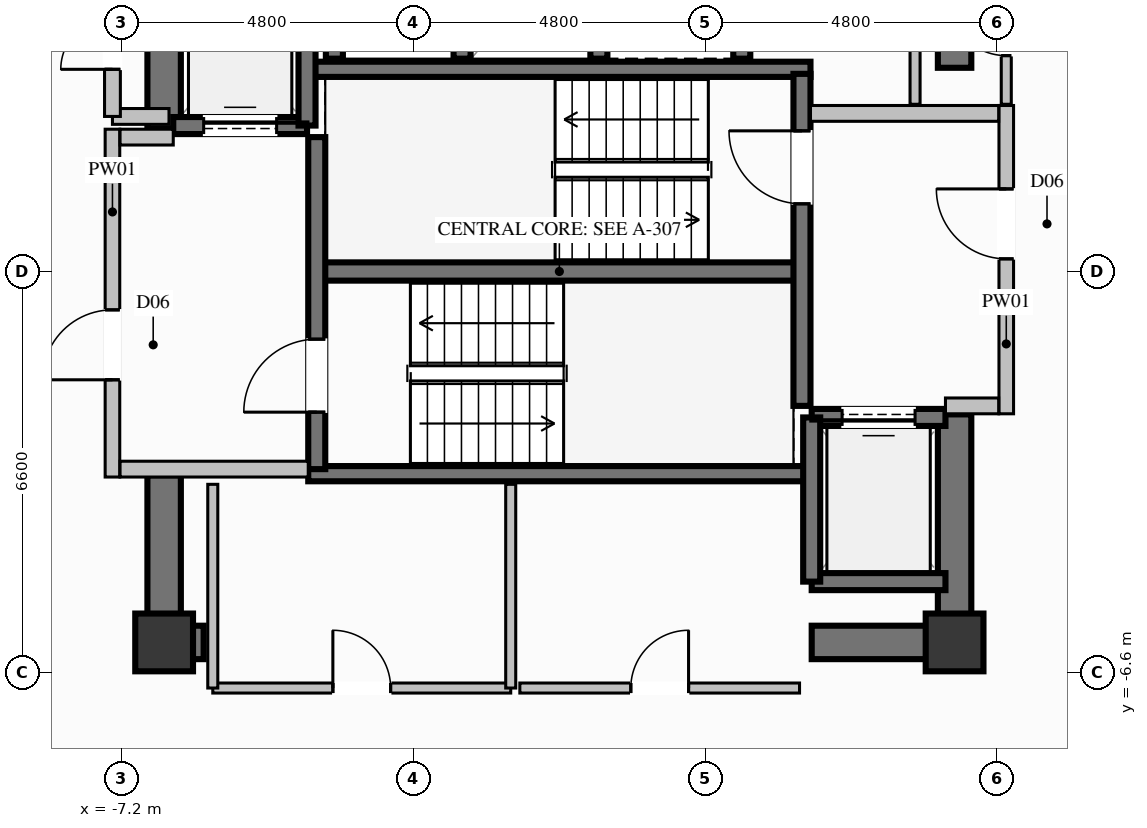
"""IFC4 building model, lengths in metres.
Left out: names, types, materials, properties, quantities, classifications, styles, units other than length and angle.
Written with IfcOpenShell. Run it as: python <this file> out.ifc"""

import sys

from ifc_helpers import new_model, si_unit, direction, frame, frame_2d, origin, origin_2d, place, context, subcontext, project, spatial, rectangle, extrude, element, fill, save


model = new_model("IFC4")
c1 = context("Model", 3, precision=1e-05, world=origin(), true_north=direction((0.0, 1.0)))
c2 = subcontext(c1, "Body", "Model", "MODEL_VIEW")
j1 = project(units=[si_unit("LENGTHUNIT", "METRE"), si_unit("PLANEANGLEUNIT", "RADIAN")], contexts=[c1])
p1 = place(None, origin())
s1 = spatial("IfcSite", under=j1, at=p1, CompositionType="ELEMENT")
p2 = place(p1, origin())
s2 = spatial("IfcBuilding", under=s1, at=p2, CompositionType="ELEMENT")
p3 = place(p2, frame((0.0, 0.0, 216.4)))
s3 = spatial("IfcBuildingStorey", under=s2, at=p3, CompositionType="ELEMENT", Elevation=216.4)
for number, where, z_axis, x_axis in (
    (1, (-6.5, -6.1, 0.0), (0.0, 0.0, 1.0), (1.0, 0.0, 0.0)),
    (2, (6.5, -6.1, 0.0), (0.0, 0.0, 1.0), (1.0, 0.0, 0.0)),
):
    element("IfcColumn", number, at=place(p3, frame(where, z_axis=z_axis, x_axis=x_axis)), inside=s3, PredefinedType="COLUMN", context=c2, shape_type="SweptSolid", body=[
        extrude(rectangle(XDim=0.95, YDim=0.95, at=origin_2d()), origin(), (0.0, 0.0, 1.0), 3.6),
    ])
p4 = place(p3, frame((-3.99, 0.0, 0.0), z_axis=(0.0, 0.0, 1.0), x_axis=(1.0, 0.0, 0.0)))
e3 = element("IfcWall", 3, at=p4, inside=s3, PredefinedType="SHEAR", context=c2, shape_type="SweptSolid", body=[
    extrude(rectangle(XDim=7.98, YDim=0.3, at=frame_2d((3.99, 0.0))), origin(), (0.0, 0.0, 1.0), 3.6),
])
for number, where, z_axis, x_axis in (
    (4, (-4.13, -3.325, 0.0), (0.0, 0.0, 1.0), (1.0, 0.0, 0.0)),
    (5, (-4.13, 3.325, 0.0), (0.0, 0.0, 1.0), (1.0, 0.0, 0.0)),
):
    element("IfcWall", number, at=place(p3, frame(where, z_axis=z_axis, x_axis=x_axis)), inside=s3, PredefinedType="SOLIDWALL", context=c2, shape_type="SweptSolid", body=[
        extrude(rectangle(XDim=8.26, YDim=0.25, at=frame_2d((4.13, 0.0))), origin(), (0.0, 0.0, 1.0), 3.6),
    ])
p5 = place(p3, frame((-6.225, -6.1, 0.0), z_axis=(0.0, 0.0, 1.0), x_axis=(1.0, 0.0, 0.0)))
e6 = element("IfcWall", 6, at=p5, inside=s3, PredefinedType="SHEAR", context=c2, shape_type="SweptSolid", body=[
    extrude(rectangle(XDim=0.375, YDim=0.55, at=frame_2d((0.188, 0.0))), origin(), (0.0, 0.0, 1.0), 3.6),
])
p6 = place(p3, frame((4.15, -6.1, 0.0), z_axis=(0.0, 0.0, 1.0), x_axis=(1.0, 0.0, 0.0)))
e7 = element("IfcWall", 7, at=p6, inside=s3, PredefinedType="SHEAR", context=c2, shape_type="SweptSolid", body=[
    extrude(rectangle(XDim=2.075, YDim=0.55, at=frame_2d((1.038, 0.0))), origin(), (0.0, 0.0, 1.0), 3.6),
])
p7 = place(p3, frame((-6.5, 2.35, 0.0), z_axis=(0.0, 0.0, 1.0), x_axis=(0.0, 1.0, 0.0)))
e8 = element("IfcWall", 8, at=p7, inside=s3, PredefinedType="SHEAR", context=c2, shape_type="SweptSolid", body=[
    extrude(rectangle(XDim=4.025, YDim=0.55, at=frame_2d((2.012, 0.0))), origin(), (0.0, 0.0, 1.0), 3.6),
])
p8 = place(p3, frame((-6.5, -6.375, 0.0), z_axis=(0.0, 0.0, 1.0), x_axis=(0.0, 1.0, 0.0)))
e9 = element("IfcWall", 9, at=p8, inside=s3, PredefinedType="SHEAR", context=c2, shape_type="SweptSolid", body=[
    extrude(rectangle(XDim=3.025, YDim=0.55, at=frame_2d((1.512, 0.0))), origin(), (0.0, 0.0, 1.0), 3.6),
])
p9 = place(p3, frame((6.5, -6.375, 0.0), z_axis=(0.0, 0.0, 1.0), x_axis=(0.0, 1.0, 0.0)))
e10 = element("IfcWall", 10, at=p9, inside=s3, PredefinedType="SHEAR", context=c2, shape_type="SweptSolid", body=[
    extrude(rectangle(XDim=4.025, YDim=0.55, at=frame_2d((2.012, 0.0))), origin(), (0.0, 0.0, 1.0), 3.6),
])
p10 = place(p3, frame((6.5, 3.35, 0.0), z_axis=(0.0, 0.0, 1.0), x_axis=(0.0, 1.0, 0.0)))
e11 = element("IfcWall", 11, at=p10, inside=s3, PredefinedType="SHEAR", context=c2, shape_type="SweptSolid", body=[
    extrude(rectangle(XDim=3.025, YDim=0.55, at=frame_2d((1.512, 0.0))), origin(), (0.0, 0.0, 1.0), 3.6),
])
for number, where, z_axis, x_axis in (
    (12, (-3.7, 6.0, 0.0), (0.0, 0.0, 1.0), (0.0, -1.0, 0.0)),
    (13, (-1.6, 3.5, 0.0), (0.0, 0.0, 1.0), (0.0, 1.0, 0.0)),
    (14, (0.65, 3.5, 0.0), (0.0, 0.0, 1.0), (0.0, 1.0, 0.0)),
    (15, (3.0, 3.5, 0.0), (0.0, 0.0, 1.0), (0.0, 1.0, 0.0)),
):
    element("IfcWall", number, at=place(p3, frame(where, z_axis=z_axis, x_axis=x_axis)), inside=s3, PredefinedType="SOLIDWALL", context=c2, shape_type="SweptSolid", body=[
        extrude(rectangle(XDim=2.5, YDim=0.28, at=frame_2d((1.25, 0.0))), origin(), (0.0, 0.0, 1.0), 3.36),
    ])
p11 = place(p3, frame((-6.35, 2.4, 0.0), z_axis=(0.0, 0.0, 1.0), x_axis=(1.0, 0.0, 0.0)))
e16 = element("IfcWall", 16, at=p11, inside=s3, PredefinedType="SOLIDWALL", context=c2, shape_type="SweptSolid", body=[
    extrude(rectangle(XDim=2.2, YDim=0.28, at=frame_2d((1.1, 0.0))), origin(), (0.0, 0.0, 1.0), 3.36),
])
p12 = place(p11, frame((0.5, 0.0, 0.0)))
e17 = element("IfcOpeningElement", 17, at=p12, cuts=e16, PredefinedType="OPENING", context=c2, shape_type="SweptSolid", body=[
    extrude(rectangle(XDim=1.2, YDim=2.2, at=frame_2d((0.6, 1.1))), frame((0.0, 0.15, 0.0), z_axis=(0.0, -1.0, 0.0), x_axis=(1.0, 0.0, 0.0)), (0.0, 0.0, 1.0), 0.3),
])
p13 = place(p3, frame((-4.15, 2.4, 0.0), z_axis=(0.0, 0.0, 1.0), x_axis=(0.0, 1.0, 0.0)))
e18 = element("IfcWall", 18, at=p13, inside=s3, PredefinedType="SOLIDWALL", context=c2, shape_type="SweptSolid", body=[
    extrude(rectangle(XDim=2.7, YDim=0.28, at=frame_2d((1.35, 0.0))), origin(), (0.0, 0.0, 1.0), 3.36),
])
p14 = place(p3, frame((4.15, -5.1, 0.0), z_axis=(0.0, 0.0, 1.0), x_axis=(1.0, 0.0, 0.0)))
e19 = element("IfcWall", 19, at=p14, inside=s3, PredefinedType="SOLIDWALL", context=c2, shape_type="SweptSolid", body=[
    extrude(rectangle(XDim=2.2, YDim=0.28, at=frame_2d((1.1, 0.0))), origin(), (0.0, 0.0, 1.0), 3.36),
])
p15 = place(p3, frame((6.35, -2.4, 0.0), z_axis=(0.0, 0.0, 1.0), x_axis=(-1.0, 0.0, 0.0)))
e20 = element("IfcWall", 20, at=p15, inside=s3, PredefinedType="SOLIDWALL", context=c2, shape_type="SweptSolid", body=[
    extrude(rectangle(XDim=2.2, YDim=0.28, at=frame_2d((1.1, 0.0))), origin(), (0.0, 0.0, 1.0), 3.36),
])
p16 = place(p15, frame((0.5, 0.0, 0.0)))
e21 = element("IfcOpeningElement", 21, at=p16, cuts=e20, PredefinedType="OPENING", context=c2, shape_type="SweptSolid", body=[
    extrude(rectangle(XDim=1.2, YDim=2.2, at=frame_2d((0.6, 1.1))), frame((0.0, 0.15, 0.0), z_axis=(0.0, -1.0, 0.0), x_axis=(1.0, 0.0, 0.0)), (0.0, 0.0, 1.0), 0.3),
])
p17 = place(p3, frame((4.15, -2.4, 0.0), z_axis=(0.0, 0.0, 1.0), x_axis=(0.0, -1.0, 0.0)))
e22 = element("IfcWall", 22, at=p17, inside=s3, PredefinedType="SOLIDWALL", context=c2, shape_type="SweptSolid", body=[
    extrude(rectangle(XDim=2.7, YDim=0.28, at=frame_2d((1.35, 0.0))), origin(), (0.0, 0.0, 1.0), 3.36),
])
p18 = place(p3, frame((-3.99, -3.25, 0.0), z_axis=(0.0, 0.0, 1.0), x_axis=(0.0, 1.0, 0.0)))
e23 = element("IfcWall", 23, at=p18, inside=s3, PredefinedType="SOLIDWALL", context=c2, shape_type="SweptSolid", body=[
    extrude(rectangle(XDim=5.46, YDim=0.28, at=frame_2d((2.73, 0.0))), origin(), (0.0, 0.0, 1.0), 3.36),
])
p19 = place(p18, frame((0.937, 0.0, 0.0)))
e24 = element("IfcOpeningElement", 24, at=p19, cuts=e23, PredefinedType="OPENING", context=c2, shape_type="SweptSolid", body=[
    extrude(rectangle(XDim=1.2, YDim=2.2, at=frame_2d((0.6, 1.1))), frame((0.0, 0.15, 0.0), z_axis=(0.0, -1.0, 0.0), x_axis=(1.0, 0.0, 0.0)), (0.0, 0.0, 1.0), 0.3),
])
p20 = place(p3, frame((3.99, -2.21, 0.0), z_axis=(0.0, 0.0, 1.0), x_axis=(0.0, 1.0, 0.0)))
e25 = element("IfcWall", 25, at=p20, inside=s3, PredefinedType="SOLIDWALL", context=c2, shape_type="SweptSolid", body=[
    extrude(rectangle(XDim=5.46, YDim=0.28, at=frame_2d((2.73, 0.0))), origin(), (0.0, 0.0, 1.0), 3.36),
])
p21 = place(p20, frame((3.323, 0.0, 0.0)))
e26 = element("IfcOpeningElement", 26, at=p21, cuts=e25, PredefinedType="OPENING", context=c2, shape_type="SweptSolid", body=[
    extrude(rectangle(XDim=1.2, YDim=2.2, at=frame_2d((0.6, 1.1))), frame((0.0, 0.15, 0.0), z_axis=(0.0, -1.0, 0.0), x_axis=(1.0, 0.0, 0.0)), (0.0, 0.0, 1.0), 0.3),
])
p22 = place(p3, frame((-7.35, -3.38, 0.0), z_axis=(0.0, 0.0, 1.0), x_axis=(0.0, 1.0, 0.0)))
e27 = element("IfcWall", 27, at=p22, inside=s3, PredefinedType="PARTITIONING", context=c2, shape_type="SweptSolid", body=[
    extrude(rectangle(XDim=5.72, YDim=0.24, at=frame_2d((2.86, 0.0))), origin(), (0.0, 0.0, 1.0), 2.445),
])
p23 = place(p22, frame((1.599, 0.0, 0.0)))
e28 = element("IfcOpeningElement", 28, at=p23, cuts=e27, PredefinedType="OPENING", context=c2, shape_type="SweptSolid", body=[
    extrude(rectangle(XDim=1.15, YDim=2.2, at=frame_2d((0.575, 1.1))), frame((0.0, 0.13, 0.0), z_axis=(0.0, -1.0, 0.0), x_axis=(1.0, 0.0, 0.0)), (0.0, 0.0, 1.0), 0.26),
])
p24 = place(p3, frame((-7.225, -3.25, 0.0), z_axis=(0.0, 0.0, 1.0), x_axis=(1.0, 0.0, 0.0)))
e29 = element("IfcWall", 29, at=p24, inside=s3, PredefinedType="PARTITIONING", context=c2, shape_type="SweptSolid", body=[
    extrude(rectangle(XDim=3.095, YDim=0.26, at=frame_2d((1.548, 0.0))), origin(), (0.0, 0.0, 1.0), 3.36),
])
p25 = place(p3, frame((-7.225, 2.21, 0.0), z_axis=(0.0, 0.0, 1.0), x_axis=(1.0, 0.0, 0.0)))
e30 = element("IfcWall", 30, at=p25, inside=s3, PredefinedType="PARTITIONING", context=c2, shape_type="SweptSolid", body=[
    extrude(rectangle(XDim=0.875, YDim=0.26, at=frame_2d((0.438, 0.0))), origin(), (0.0, 0.0, 1.0), 3.36),
])
p26 = place(p3, frame((7.35, -2.34, 0.0), z_axis=(0.0, 0.0, 1.0), x_axis=(0.0, 1.0, 0.0)))
e31 = element("IfcWall", 31, at=p26, inside=s3, PredefinedType="PARTITIONING", context=c2, shape_type="SweptSolid", body=[
    extrude(rectangle(XDim=5.07, YDim=0.24, at=frame_2d((2.535, 0.0))), origin(), (0.0, 0.0, 1.0), 2.445),
])
p27 = place(p26, frame((2.548, 0.0, 0.0)))
e32 = element("IfcOpeningElement", 32, at=p27, cuts=e31, PredefinedType="OPENING", context=c2, shape_type="SweptSolid", body=[
    extrude(rectangle(XDim=1.15, YDim=2.2, at=frame_2d((0.575, 1.1))), frame((0.0, 0.13, 0.0), z_axis=(0.0, -1.0, 0.0), x_axis=(1.0, 0.0, 0.0)), (0.0, 0.0, 1.0), 0.26),
])
p28 = place(p3, frame((6.35, -2.21, 0.0), z_axis=(0.0, 0.0, 1.0), x_axis=(1.0, 0.0, 0.0)))
e33 = element("IfcWall", 33, at=p28, inside=s3, PredefinedType="PARTITIONING", context=c2, shape_type="SweptSolid", body=[
    extrude(rectangle(XDim=0.875, YDim=0.26, at=frame_2d((0.438, 0.0))), origin(), (0.0, 0.0, 1.0), 3.36),
])
p29 = place(p3, frame((4.13, 2.6, 0.0), z_axis=(0.0, 0.0, 1.0), x_axis=(1.0, 0.0, 0.0)))
e34 = element("IfcWall", 34, at=p29, inside=s3, PredefinedType="PARTITIONING", context=c2, shape_type="SweptSolid", body=[
    extrude(rectangle(XDim=3.095, YDim=0.26, at=frame_2d((1.548, 0.0))), origin(), (0.0, 0.0, 1.0), 3.36),
])
p30 = place(p3, frame((-7.35, 2.55, 0.0), z_axis=(0.0, 0.0, 1.0), x_axis=(1.0, 0.0, 0.0)))
e35 = element("IfcWall", 35, at=p30, inside=s3, PredefinedType="PARTITIONING", context=c2, shape_type="SweptSolid", body=[
    extrude(rectangle(XDim=0.93, YDim=0.26, at=frame_2d((0.465, 0.0))), origin(), (0.0, 0.0, 1.0), 3.36),
])
p31 = place(p3, frame((-7.35, 2.55, 0.0), z_axis=(0.0, 0.0, 1.0), x_axis=(0.0, 1.0, 0.0)))
e36 = element("IfcWall", 36, at=p31, inside=s3, PredefinedType="PARTITIONING", context=c2, shape_type="SweptSolid", body=[
    extrude(rectangle(XDim=2.4, YDim=0.26, at=frame_2d((1.2, 0.0))), origin(), (0.0, 0.0, 1.0), 2.445),
])
p32 = place(p31, frame((0.775, 0.0, 0.0)))
e37 = element("IfcOpeningElement", 37, at=p32, cuts=e36, PredefinedType="OPENING", context=c2, shape_type="SweptSolid", body=[
    extrude(rectangle(XDim=0.85, YDim=2.05, at=frame_2d((0.425, 1.025))), frame((0.0, 0.14, 0.0), z_axis=(0.0, -1.0, 0.0), x_axis=(1.0, 0.0, 0.0)), (0.0, 0.0, 1.0), 0.28),
])
p33 = place(p3, frame((7.35, 2.75, 0.0), z_axis=(0.0, 0.0, 1.0), x_axis=(0.0, 1.0, 0.0)))
e38 = element("IfcWall", 38, at=p33, inside=s3, PredefinedType="PARTITIONING", context=c2, shape_type="SweptSolid", body=[
    extrude(rectangle(XDim=2.55, YDim=0.165, at=frame_2d((1.275, 0.0))), origin(), (0.0, 0.0, 1.0), 3.36),
])
p34 = place(p33, frame((0.8, 0.0, 0.0)))
e39 = element("IfcOpeningElement", 39, at=p34, cuts=e38, PredefinedType="OPENING", context=c2, shape_type="SweptSolid", body=[
    extrude(rectangle(XDim=0.95, YDim=2.1, at=frame_2d((0.475, 1.05))), frame((0.0, 0.093, 0.0), z_axis=(0.0, -1.0, 0.0), x_axis=(1.0, 0.0, 0.0)), (0.0, 0.0, 1.0), 0.185),
])
p35 = place(p3, frame((5.85, 5.3, 0.0), z_axis=(0.0, 0.0, 1.0), x_axis=(0.0, -1.0, 0.0)))
e40 = element("IfcWall", 40, at=p35, inside=s3, PredefinedType="PARTITIONING", context=c2, shape_type="SweptSolid", body=[
    extrude(rectangle(XDim=2.55, YDim=0.165, at=frame_2d((1.275, 0.0))), origin(), (0.0, 0.0, 1.0), 2.445),
])
p36 = place(p3, frame((-5.7, -6.85, 0.0), z_axis=(0.0, 0.0, 1.0), x_axis=(1.0, 0.0, 0.0)))
e41 = element("IfcWall", 41, at=p36, inside=s3, PredefinedType="PARTITIONING", context=c2, shape_type="SweptSolid", body=[
    extrude(rectangle(XDim=4.9, YDim=0.165, at=frame_2d((2.45, 0.0))), origin(), (0.0, 0.0, 1.0), 2.445),
])
p37 = place(p36, frame((1.975, 0.0, 0.0)))
e42 = element("IfcOpeningElement", 42, at=p37, cuts=e41, PredefinedType="OPENING", context=c2, shape_type="SweptSolid", body=[
    extrude(rectangle(XDim=0.95, YDim=2.1, at=frame_2d((0.475, 1.05))), frame((0.0, 0.093, 0.0), z_axis=(0.0, -1.0, 0.0), x_axis=(1.0, 0.0, 0.0)), (0.0, 0.0, 1.0), 0.185),
])
p38 = place(p3, frame((-0.8, -6.85, 0.0), z_axis=(0.0, 0.0, 1.0), x_axis=(0.0, 1.0, 0.0)))
e43 = element("IfcWall", 43, at=p38, inside=s3, PredefinedType="PARTITIONING", context=c2, shape_type="SweptSolid", body=[
    extrude(rectangle(XDim=3.35, YDim=0.165, at=frame_2d((1.675, 0.0))), origin(), (0.0, 0.0, 1.0), 3.36),
])
p39 = place(p3, frame((-5.7, -3.5, 0.0), z_axis=(0.0, 0.0, 1.0), x_axis=(0.0, -1.0, 0.0)))
e44 = element("IfcWall", 44, at=p39, inside=s3, PredefinedType="PARTITIONING", context=c2, shape_type="SweptSolid", body=[
    extrude(rectangle(XDim=3.35, YDim=0.165, at=frame_2d((1.675, 0.0))), origin(), (0.0, 0.0, 1.0), 2.445),
])
p40 = place(p3, frame((-0.65, -6.85, 0.0), z_axis=(0.0, 0.0, 1.0), x_axis=(1.0, 0.0, 0.0)))
e45 = element("IfcWall", 45, at=p40, inside=s3, PredefinedType="PARTITIONING", context=c2, shape_type="SweptSolid", body=[
    extrude(rectangle(XDim=4.6, YDim=0.165, at=frame_2d((2.3, 0.0))), origin(), (0.0, 0.0, 1.0), 2.445),
])
p41 = place(p40, frame((1.825, 0.0, 0.0)))
e46 = element("IfcOpeningElement", 46, at=p41, cuts=e45, PredefinedType="OPENING", context=c2, shape_type="SweptSolid", body=[
    extrude(rectangle(XDim=0.95, YDim=2.1, at=frame_2d((0.475, 1.05))), frame((0.0, 0.093, 0.0), z_axis=(0.0, -1.0, 0.0), x_axis=(1.0, 0.0, 0.0)), (0.0, 0.0, 1.0), 0.185),
])
p42 = place(p12, origin())
e47 = element("IfcDoor", 47, at=p42, inside=s3, OperationType="SLIDING_TO_LEFT", PredefinedType="DOOR", context=c2, shape_type="SweptSolid", body=[
    extrude(rectangle(XDim=1.2, YDim=2.2, at=frame_2d((0.6, 1.1))), frame((0.0, 0.025, 0.0), z_axis=(0.0, -1.0, 0.0), x_axis=(1.0, 0.0, 0.0)), (0.0, 0.0, 1.0), 0.05),
])
fill(e17, e47)
p43 = place(p16, origin())
e48 = element("IfcDoor", 48, at=p43, inside=s3, OperationType="SLIDING_TO_LEFT", PredefinedType="DOOR", context=c2, shape_type="SweptSolid", body=[
    extrude(rectangle(XDim=1.2, YDim=2.2, at=frame_2d((0.6, 1.1))), frame((0.0, 0.025, 0.0), z_axis=(0.0, -1.0, 0.0), x_axis=(1.0, 0.0, 0.0)), (0.0, 0.0, 1.0), 0.05),
])
fill(e21, e48)
p44 = place(p19, origin())
e49 = element("IfcDoor", 49, at=p44, inside=s3, OperationType="SINGLE_SWING_LEFT", PredefinedType="DOOR", context=c2, shape_type="SweptSolid", body=[
    extrude(rectangle(XDim=1.2, YDim=2.2, at=frame_2d((0.6, 1.1))), frame((0.0, 0.025, 0.0), z_axis=(0.0, -1.0, 0.0), x_axis=(1.0, 0.0, 0.0)), (0.0, 0.0, 1.0), 0.05),
])
fill(e24, e49)
p45 = place(p21, origin())
e50 = element("IfcDoor", 50, at=p45, inside=s3, OperationType="SINGLE_SWING_RIGHT", PredefinedType="DOOR", context=c2, shape_type="SweptSolid", body=[
    extrude(rectangle(XDim=1.2, YDim=2.2, at=frame_2d((0.6, 1.1))), frame((0.0, 0.025, 0.0), z_axis=(0.0, -1.0, 0.0), x_axis=(1.0, 0.0, 0.0)), (0.0, 0.0, 1.0), 0.05),
])
fill(e26, e50)
p46 = place(p23, origin())
e51 = element("IfcDoor", 51, at=p46, inside=s3, OperationType="SINGLE_SWING_LEFT", PredefinedType="DOOR", context=c2, shape_type="SweptSolid", body=[
    extrude(rectangle(XDim=1.15, YDim=2.2, at=frame_2d((0.575, 1.1))), frame((0.0, 0.025, 0.0), z_axis=(0.0, -1.0, 0.0), x_axis=(1.0, 0.0, 0.0)), (0.0, 0.0, 1.0), 0.05),
])
fill(e28, e51)
p47 = place(p27, origin())
e52 = element("IfcDoor", 52, at=p47, inside=s3, OperationType="SINGLE_SWING_RIGHT", PredefinedType="DOOR", context=c2, shape_type="SweptSolid", body=[
    extrude(rectangle(XDim=1.15, YDim=2.2, at=frame_2d((0.575, 1.1))), frame((0.0, 0.025, 0.0), z_axis=(0.0, -1.0, 0.0), x_axis=(1.0, 0.0, 0.0)), (0.0, 0.0, 1.0), 0.05),
])
fill(e32, e52)
p48 = place(p32, origin())
e53 = element("IfcDoor", 53, at=p48, inside=s3, OperationType="SINGLE_SWING_LEFT", PredefinedType="DOOR", context=c2, shape_type="SweptSolid", body=[
    extrude(rectangle(XDim=0.85, YDim=2.05, at=frame_2d((0.425, 1.025))), frame((0.0, 0.025, 0.0), z_axis=(0.0, -1.0, 0.0), x_axis=(1.0, 0.0, 0.0)), (0.0, 0.0, 1.0), 0.05),
])
fill(e37, e53)
p49 = place(p34, origin())
e54 = element("IfcDoor", 54, at=p49, inside=s3, OperationType="SINGLE_SWING_RIGHT", PredefinedType="DOOR", context=c2, shape_type="SweptSolid", body=[
    extrude(rectangle(XDim=0.95, YDim=2.1, at=frame_2d((0.475, 1.05))), frame((0.0, 0.025, 0.0), z_axis=(0.0, -1.0, 0.0), x_axis=(1.0, 0.0, 0.0)), (0.0, 0.0, 1.0), 0.05),
])
fill(e39, e54)
p50 = place(p37, origin())
e55 = element("IfcDoor", 55, at=p50, inside=s3, OperationType="SINGLE_SWING_LEFT", PredefinedType="DOOR", context=c2, shape_type="SweptSolid", body=[
    extrude(rectangle(XDim=0.95, YDim=2.1, at=frame_2d((0.475, 1.05))), frame((0.0, 0.025, 0.0), z_axis=(0.0, -1.0, 0.0), x_axis=(1.0, 0.0, 0.0)), (0.0, 0.0, 1.0), 0.05),
])
fill(e42, e55)
p51 = place(p41, origin())
e56 = element("IfcDoor", 56, at=p51, inside=s3, OperationType="SINGLE_SWING_RIGHT", PredefinedType="DOOR", context=c2, shape_type="SweptSolid", body=[
    extrude(rectangle(XDim=0.95, YDim=2.1, at=frame_2d((0.475, 1.05))), frame((0.0, 0.025, 0.0), z_axis=(0.0, -1.0, 0.0), x_axis=(1.0, 0.0, 0.0)), (0.0, 0.0, 1.0), 0.05),
])
fill(e46, e56)
save(model, sys.argv[1])
